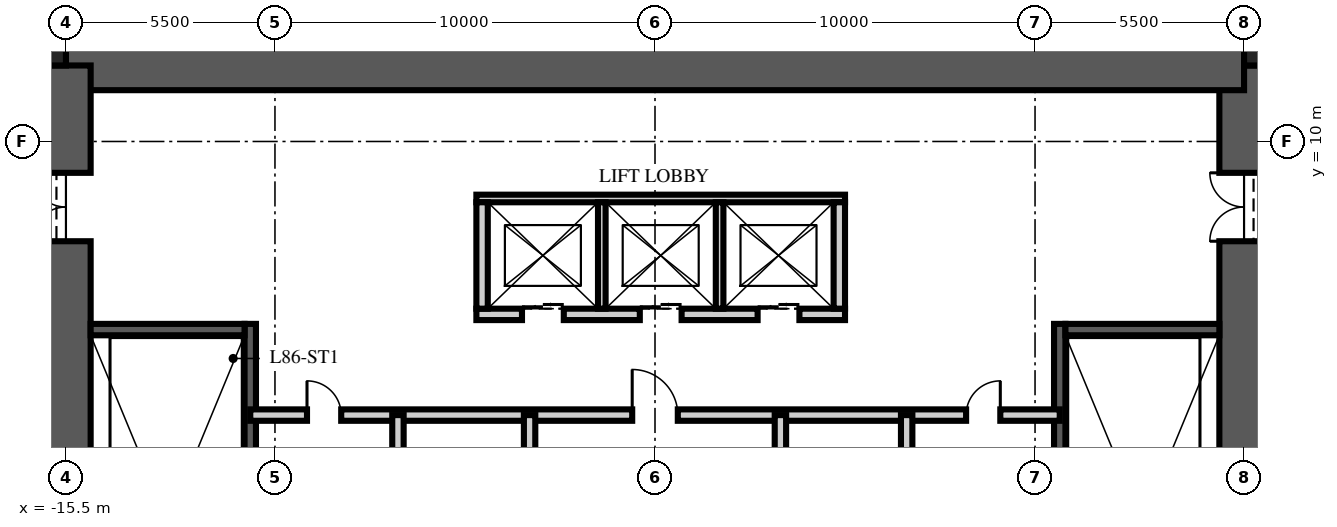
"""IFC4 building model, lengths in metres.
Left out: names, types, materials, properties, quantities, classifications, styles, units other than length and angle.
Written with IfcOpenShell. Run it as: python <this file> out.ifc"""

import sys

from ifc_helpers import new_model, si_unit, direction, frame, frame_2d, origin, origin_2d, place, context, subcontext, project, spatial, rectangle, extrude, element, fill, save


model = new_model("IFC4")
c1 = context("Model", 3, precision=1e-05, world=origin(), true_north=direction((0.0, 1.0)))
c2 = subcontext(c1, "Body", "Model", "MODEL_VIEW")
j1 = project(units=[si_unit("LENGTHUNIT", "METRE"), si_unit("PLANEANGLEUNIT", "RADIAN")], contexts=[c1])
p1 = place(None, origin())
s1 = spatial("IfcSite", under=j1, at=p1, CompositionType="ELEMENT")
p2 = place(p1, origin())
s2 = spatial("IfcBuilding", under=s1, at=p2, CompositionType="ELEMENT")
p3 = place(p2, frame((0.0, 0.0, 342.0)))
s3 = spatial("IfcBuildingStorey", under=s2, at=p3, CompositionType="ELEMENT", Elevation=342.0)
p4 = place(p3, frame((15.5, -12.0, -0.25), z_axis=(0.0, 0.0, 1.0), x_axis=(0.0, 1.0, 0.0)))
e1 = element("IfcWall", 1, at=p4, inside=s3, PredefinedType="SHEAR", context=c2, shape_type="SweptSolid", body=[
    extrude(rectangle(XDim=24.0, YDim=1.3, at=frame_2d((12.0, 0.0))), origin(), (0.0, 0.0, 1.0), 3.75),
])
p5 = place(p4, frame((3.125, 0.0, 0.25)))
e2 = element("IfcOpeningElement", 2, at=p5, cuts=e1, PredefinedType="OPENING", context=c2, shape_type="SweptSolid", body=[
    extrude(rectangle(XDim=1.2, YDim=2.1, at=frame_2d((0.6, 1.05))), frame((0.0, 0.66, 0.0), z_axis=(0.0, -1.0, 0.0), x_axis=(1.0, 0.0, 0.0)), (0.0, 0.0, 1.0), 1.32),
])
p6 = place(p4, frame((19.375, 0.0, 0.25)))
e3 = element("IfcOpeningElement", 3, at=p6, cuts=e1, PredefinedType="OPENING", context=c2, shape_type="SweptSolid", body=[
    extrude(rectangle(XDim=1.8, YDim=2.1, at=frame_2d((0.9, 1.05))), frame((0.0, 0.66, 0.0), z_axis=(0.0, -1.0, 0.0), x_axis=(1.0, 0.0, 0.0)), (0.0, 0.0, 1.0), 1.32),
])
p7 = place(p3, frame((-15.5, 12.0, -0.25), z_axis=(0.0, 0.0, 1.0), x_axis=(1.0, 0.0, 0.0)))
e4 = element("IfcWall", 4, at=p7, inside=s3, PredefinedType="SHEAR", context=c2, shape_type="SweptSolid", body=[
    extrude(rectangle(XDim=31.0, YDim=1.3, at=frame_2d((15.5, 0.0))), origin(), (0.0, 0.0, 1.0), 3.75),
])
p8 = place(p3, frame((-15.5, -12.0, -0.25), z_axis=(0.0, 0.0, 1.0), x_axis=(0.0, 1.0, 0.0)))
e5 = element("IfcWall", 5, at=p8, inside=s3, PredefinedType="SHEAR", context=c2, shape_type="SweptSolid", body=[
    extrude(rectangle(XDim=24.0, YDim=1.3, at=frame_2d((12.0, 0.0))), origin(), (0.0, 0.0, 1.0), 3.75),
])
p9 = place(p8, frame((3.125, 0.0, 0.25)))
e6 = element("IfcOpeningElement", 6, at=p9, cuts=e5, PredefinedType="OPENING", context=c2, shape_type="SweptSolid", body=[
    extrude(rectangle(XDim=1.2, YDim=2.1, at=frame_2d((0.6, 1.05))), frame((0.0, 0.66, 0.0), z_axis=(0.0, -1.0, 0.0), x_axis=(1.0, 0.0, 0.0)), (0.0, 0.0, 1.0), 1.32),
])
p10 = place(p8, frame((19.375, 0.0, 0.25)))
e7 = element("IfcOpeningElement", 7, at=p10, cuts=e5, PredefinedType="OPENING", context=c2, shape_type="SweptSolid", body=[
    extrude(rectangle(XDim=1.8, YDim=2.1, at=frame_2d((0.9, 1.05))), frame((0.0, 0.66, 0.0), z_axis=(0.0, -1.0, 0.0), x_axis=(1.0, 0.0, 0.0)), (0.0, 0.0, 1.0), 1.32),
])
for number, where, z_axis, x_axis in (
    (8, (15.825, 12.325, -0.25), (0.0, 0.0, 1.0), (1.0, 0.0, 0.0)),
    (9, (-15.825, 12.325, -0.25), (0.0, 0.0, 1.0), (1.0, 0.0, 0.0)),
):
    element("IfcColumn", number, at=place(p3, frame(where, z_axis=z_axis, x_axis=x_axis)), inside=s3, PredefinedType="COLUMN", context=c2, shape_type="SweptSolid", body=[
        extrude(rectangle(XDim=0.65, YDim=0.65, at=origin_2d()), origin(), (0.0, 0.0, 1.0), 3.75),
    ])
p11 = place(p3, frame((-10.65, -4.9, 0.0), z_axis=(0.0, 0.0, 1.0), x_axis=(0.0, 1.0, 0.0)))
e10 = element("IfcWall", 10, at=p11, inside=s3, PredefinedType="SOLIDWALL", context=c2, shape_type="SweptSolid", body=[
    extrude(rectangle(XDim=10.1, YDim=0.3, at=frame_2d((5.05, 0.0))), origin(), (0.0, 0.0, 1.0), 3.5),
])
p12 = place(p3, frame((-14.85, 5.05, 0.0), z_axis=(0.0, 0.0, 1.0), x_axis=(1.0, 0.0, 0.0)))
e11 = element("IfcWall", 11, at=p12, inside=s3, PredefinedType="SOLIDWALL", context=c2, shape_type="SweptSolid", body=[
    extrude(rectangle(XDim=4.05, YDim=0.3, at=frame_2d((2.025, 0.0))), origin(), (0.0, 0.0, 1.0), 3.5),
])
p13 = place(p3, frame((10.65, -4.9, 0.0), z_axis=(0.0, 0.0, 1.0), x_axis=(0.0, 1.0, 0.0)))
e12 = element("IfcWall", 12, at=p13, inside=s3, PredefinedType="SOLIDWALL", context=c2, shape_type="SweptSolid", body=[
    extrude(rectangle(XDim=10.1, YDim=0.3, at=frame_2d((5.05, 0.0))), origin(), (0.0, 0.0, 1.0), 3.5),
])
p14 = place(p3, frame((14.85, 5.05, 0.0), z_axis=(0.0, 0.0, 1.0), x_axis=(-1.0, 0.0, 0.0)))
e13 = element("IfcWall", 13, at=p14, inside=s3, PredefinedType="SOLIDWALL", context=c2, shape_type="SweptSolid", body=[
    extrude(rectangle(XDim=4.05, YDim=0.3, at=frame_2d((2.025, 0.0))), origin(), (0.0, 0.0, 1.0), 3.5),
])
p15 = place(p3, frame((-4.7, 5.45, 0.0), z_axis=(0.0, 0.0, 1.0), x_axis=(1.0, 0.0, 0.0)))
e14 = element("IfcWall", 14, at=p15, inside=s3, PredefinedType="PARTITIONING", context=c2, shape_type="SweptSolid", body=[
    extrude(rectangle(XDim=9.7, YDim=0.3, at=frame_2d((4.85, 0.0))), origin(), (0.0, 0.0, 1.0), 3.5),
])
p16 = place(p15, frame((1.2, 0.0, 0.0)))
e15 = element("IfcOpeningElement", 15, at=p16, cuts=e14, PredefinedType="OPENING", context=c2, shape_type="SweptSolid", body=[
    extrude(rectangle(XDim=1.1, YDim=2.1, at=frame_2d((0.55, 1.05))), frame((0.0, 0.16, 0.0), z_axis=(0.0, -1.0, 0.0), x_axis=(1.0, 0.0, 0.0)), (0.0, 0.0, 1.0), 0.32),
])
p17 = place(p15, frame((4.3, 0.0, 0.0)))
e16 = element("IfcOpeningElement", 16, at=p17, cuts=e14, PredefinedType="OPENING", context=c2, shape_type="SweptSolid", body=[
    extrude(rectangle(XDim=1.1, YDim=2.1, at=frame_2d((0.55, 1.05))), frame((0.0, 0.16, 0.0), z_axis=(0.0, -1.0, 0.0), x_axis=(1.0, 0.0, 0.0)), (0.0, 0.0, 1.0), 0.32),
])
p18 = place(p15, frame((7.4, 0.0, 0.0)))
e17 = element("IfcOpeningElement", 17, at=p18, cuts=e14, PredefinedType="OPENING", context=c2, shape_type="SweptSolid", body=[
    extrude(rectangle(XDim=1.1, YDim=2.1, at=frame_2d((0.55, 1.05))), frame((0.0, 0.16, 0.0), z_axis=(0.0, -1.0, 0.0), x_axis=(1.0, 0.0, 0.0)), (0.0, 0.0, 1.0), 0.32),
])
p19 = place(p3, frame((-4.7, 8.5, 0.0), z_axis=(0.0, 0.0, 1.0), x_axis=(1.0, 0.0, 0.0)))
e18 = element("IfcWall", 18, at=p19, inside=s3, PredefinedType="PARTITIONING", context=c2, shape_type="SweptSolid", body=[
    extrude(rectangle(XDim=9.7, YDim=0.2, at=frame_2d((4.85, 0.0))), origin(), (0.0, 0.0, 1.0), 3.5),
])
for number, where, z_axis, x_axis in (
    (19, (-4.55, 5.6, 0.0), (0.0, 0.0, 1.0), (0.0, 1.0, 0.0)),
    (20, (4.85, 5.6, 0.0), (0.0, 0.0, 1.0), (0.0, 1.0, 0.0)),
):
    element("IfcWall", number, at=place(p3, frame(where, z_axis=z_axis, x_axis=x_axis)), inside=s3, PredefinedType="PARTITIONING", context=c2, shape_type="SweptSolid", body=[
        extrude(rectangle(XDim=2.8, YDim=0.3, at=frame_2d((1.4, 0.0))), origin(), (0.0, 0.0, 1.0), 3.5),
    ])
for number, where, z_axis, x_axis in (
    (21, (-1.4, 5.6, 0.0), (0.0, 0.0, 1.0), (0.0, 1.0, 0.0)),
    (22, (1.7, 5.6, 0.0), (0.0, 0.0, 1.0), (0.0, 1.0, 0.0)),
):
    element("IfcWall", number, at=place(p3, frame(where, z_axis=z_axis, x_axis=x_axis)), inside=s3, PredefinedType="PARTITIONING", context=c2, shape_type="SweptSolid", body=[
        extrude(rectangle(XDim=2.8, YDim=0.2, at=frame_2d((1.4, 0.0))), origin(), (0.0, 0.0, 1.0), 3.5),
    ])
p20 = place(p3, frame((-10.65, 2.8, 0.0), z_axis=(0.0, 0.0, 1.0), x_axis=(1.0, 0.0, 0.0)))
e23 = element("IfcWall", 23, at=p20, inside=s3, PredefinedType="PARTITIONING", context=c2, shape_type="SweptSolid", body=[
    extrude(rectangle(XDim=21.3, YDim=0.3, at=frame_2d((10.65, 0.0))), origin(), (0.0, 0.0, 1.0), 3.5),
])
p21 = place(p20, frame((10.05, 0.0, 0.0)))
e24 = element("IfcOpeningElement", 24, at=p21, cuts=e23, PredefinedType="OPENING", context=c2, shape_type="SweptSolid", body=[
    extrude(rectangle(XDim=1.2, YDim=2.1, at=frame_2d((0.6, 1.05))), frame((0.0, 0.16, 0.0), z_axis=(0.0, -1.0, 0.0), x_axis=(1.0, 0.0, 0.0)), (0.0, 0.0, 1.0), 0.32),
])
p22 = place(p20, frame((1.493, 0.0, 0.0)))
e25 = element("IfcOpeningElement", 25, at=p22, cuts=e23, PredefinedType="OPENING", context=c2, shape_type="SweptSolid", body=[
    extrude(rectangle(XDim=0.9, YDim=2.1, at=frame_2d((0.45, 1.05))), frame((0.0, 0.16, 0.0), z_axis=(0.0, -1.0, 0.0), x_axis=(1.0, 0.0, 0.0)), (0.0, 0.0, 1.0), 0.32),
])
p23 = place(p20, frame((18.836, 0.0, 0.0)))
e26 = element("IfcOpeningElement", 26, at=p23, cuts=e23, PredefinedType="OPENING", context=c2, shape_type="SweptSolid", body=[
    extrude(rectangle(XDim=0.9, YDim=2.1, at=frame_2d((0.45, 1.05))), frame((0.0, 0.16, 0.0), z_axis=(0.0, -1.0, 0.0), x_axis=(1.0, 0.0, 0.0)), (0.0, 0.0, 1.0), 0.32),
])
p24 = place(p3, frame((-3.3, -6.65, 0.0), z_axis=(0.0, 0.0, 1.0), x_axis=(0.0, 1.0, 0.0)))
e27 = element("IfcWall", 27, at=p24, inside=s3, PredefinedType="PARTITIONING", context=c2, shape_type="SweptSolid", body=[
    extrude(rectangle(XDim=9.45, YDim=0.3, at=frame_2d((4.725, 0.0))), origin(), (0.0, 0.0, 1.0), 3.5),
])
p25 = place(p24, frame((4.275, 0.0, 0.0)))
e28 = element("IfcOpeningElement", 28, at=p25, cuts=e27, PredefinedType="OPENING", context=c2, shape_type="SweptSolid", body=[
    extrude(rectangle(XDim=0.9, YDim=2.1, at=frame_2d((0.45, 1.05))), frame((0.0, 0.16, 0.0), z_axis=(0.0, -1.0, 0.0), x_axis=(1.0, 0.0, 0.0)), (0.0, 0.0, 1.0), 0.32),
])
p26 = place(p3, frame((3.3, -6.65, 0.0), z_axis=(0.0, 0.0, 1.0), x_axis=(0.0, 1.0, 0.0)))
e29 = element("IfcWall", 29, at=p26, inside=s3, PredefinedType="PARTITIONING", context=c2, shape_type="SweptSolid", body=[
    extrude(rectangle(XDim=9.45, YDim=0.3, at=frame_2d((4.725, 0.0))), origin(), (0.0, 0.0, 1.0), 3.5),
])
p27 = place(p26, frame((4.275, 0.0, 0.0)))
e30 = element("IfcOpeningElement", 30, at=p27, cuts=e29, PredefinedType="OPENING", context=c2, shape_type="SweptSolid", body=[
    extrude(rectangle(XDim=0.9, YDim=2.1, at=frame_2d((0.45, 1.05))), frame((0.0, 0.16, 0.0), z_axis=(0.0, -1.0, 0.0), x_axis=(1.0, 0.0, 0.0)), (0.0, 0.0, 1.0), 0.32),
])
for number, where, z_axis, x_axis in (
    (31, (-6.764, -6.65, 0.0), (0.0, 0.0, 1.0), (0.0, 1.0, 0.0)),
    (32, (6.622, -6.65, 0.0), (0.0, 0.0, 1.0), (0.0, 1.0, 0.0)),
):
    element("IfcWall", number, at=place(p3, frame(where, z_axis=z_axis, x_axis=x_axis)), inside=s3, PredefinedType="PARTITIONING", context=c2, shape_type="SweptSolid", body=[
        extrude(rectangle(XDim=9.45, YDim=0.3, at=frame_2d((4.725, 0.0))), origin(), (0.0, 0.0, 1.0), 3.5),
    ])
p28 = place(p10, origin())
e33 = element("IfcDoor", 33, at=p28, inside=s3, OperationType="DOUBLE_DOOR_SINGLE_SWING", PredefinedType="DOOR", context=c2, shape_type="SweptSolid", body=[
    extrude(rectangle(XDim=1.8, YDim=2.1, at=frame_2d((0.9, 1.05))), frame((0.0, 0.025, 0.0), z_axis=(0.0, -1.0, 0.0), x_axis=(1.0, 0.0, 0.0)), (0.0, 0.0, 1.0), 0.05),
])
fill(e7, e33)
p29 = place(p6, origin())
e34 = element("IfcDoor", 34, at=p29, inside=s3, OperationType="DOUBLE_DOOR_SINGLE_SWING", PredefinedType="DOOR", context=c2, shape_type="SweptSolid", body=[
    extrude(rectangle(XDim=1.8, YDim=2.1, at=frame_2d((0.9, 1.05))), frame((0.0, 0.025, 0.0), z_axis=(0.0, -1.0, 0.0), x_axis=(1.0, 0.0, 0.0)), (0.0, 0.0, 1.0), 0.05),
])
fill(e3, e34)
p30 = place(p16, origin())
e35 = element("IfcDoor", 35, at=p30, inside=s3, OperationType="DOUBLE_DOOR_SLIDING", PredefinedType="DOOR", context=c2, shape_type="SweptSolid", body=[
    extrude(rectangle(XDim=1.1, YDim=2.1, at=frame_2d((0.55, 1.05))), frame((0.0, 0.025, 0.0), z_axis=(0.0, -1.0, 0.0), x_axis=(1.0, 0.0, 0.0)), (0.0, 0.0, 1.0), 0.05),
])
fill(e15, e35)
p31 = place(p17, origin())
e36 = element("IfcDoor", 36, at=p31, inside=s3, OperationType="DOUBLE_DOOR_SLIDING", PredefinedType="DOOR", context=c2, shape_type="SweptSolid", body=[
    extrude(rectangle(XDim=1.1, YDim=2.1, at=frame_2d((0.55, 1.05))), frame((0.0, 0.025, 0.0), z_axis=(0.0, -1.0, 0.0), x_axis=(1.0, 0.0, 0.0)), (0.0, 0.0, 1.0), 0.05),
])
fill(e16, e36)
p32 = place(p18, origin())
e37 = element("IfcDoor", 37, at=p32, inside=s3, OperationType="DOUBLE_DOOR_SLIDING", PredefinedType="DOOR", context=c2, shape_type="SweptSolid", body=[
    extrude(rectangle(XDim=1.1, YDim=2.1, at=frame_2d((0.55, 1.05))), frame((0.0, 0.025, 0.0), z_axis=(0.0, -1.0, 0.0), x_axis=(1.0, 0.0, 0.0)), (0.0, 0.0, 1.0), 0.05),
])
fill(e17, e37)
p33 = place(p21, origin())
e38 = element("IfcDoor", 38, at=p33, inside=s3, OperationType="SINGLE_SWING_LEFT", PredefinedType="DOOR", context=c2, shape_type="SweptSolid", body=[
    extrude(rectangle(XDim=1.2, YDim=2.1, at=frame_2d((0.6, 1.05))), frame((0.0, 0.025, 0.0), z_axis=(0.0, -1.0, 0.0), x_axis=(1.0, 0.0, 0.0)), (0.0, 0.0, 1.0), 0.05),
])
fill(e24, e38)
p34 = place(p22, origin())
e39 = element("IfcDoor", 39, at=p34, inside=s3, OperationType="SINGLE_SWING_LEFT", PredefinedType="DOOR", context=c2, shape_type="SweptSolid", body=[
    extrude(rectangle(XDim=0.9, YDim=2.1, at=frame_2d((0.45, 1.05))), frame((0.0, 0.025, 0.0), z_axis=(0.0, -1.0, 0.0), x_axis=(1.0, 0.0, 0.0)), (0.0, 0.0, 1.0), 0.05),
])
fill(e25, e39)
p35 = place(p23, origin())
e40 = element("IfcDoor", 40, at=p35, inside=s3, OperationType="SINGLE_SWING_RIGHT", PredefinedType="DOOR", context=c2, shape_type="SweptSolid", body=[
    extrude(rectangle(XDim=0.9, YDim=2.1, at=frame_2d((0.45, 1.05))), frame((0.0, 0.025, 0.0), z_axis=(0.0, -1.0, 0.0), x_axis=(1.0, 0.0, 0.0)), (0.0, 0.0, 1.0), 0.05),
])
fill(e26, e40)
save(model, sys.argv[1])
